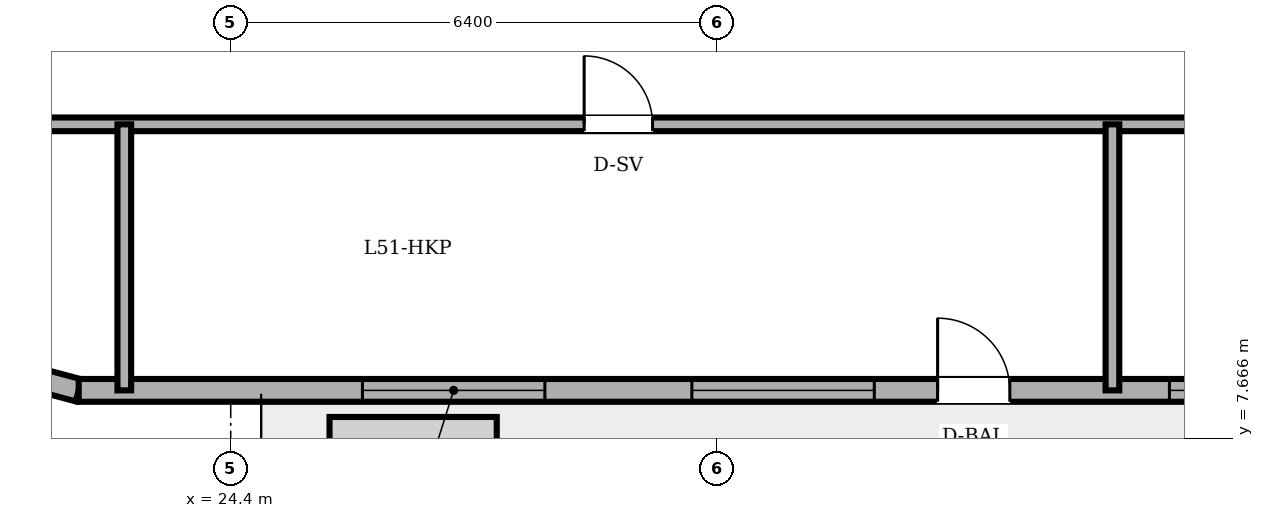
"""IFC4 building model, lengths in metres.
Left out: names, types, materials, properties, quantities, classifications, styles, units other than length and angle.
Written with IfcOpenShell. Run it as: python <this file> out.ifc"""

import sys

from ifc_helpers import new_model, si_unit, direction, frame, frame_2d, origin, place, context, subcontext, project, spatial, rectangle, extrude, element, fill, save


model = new_model("IFC4")
c1 = context("Model", 3, precision=1e-05, world=origin(), true_north=direction((0.0, 1.0)))
c2 = subcontext(c1, "Body", "Model", "MODEL_VIEW")
j1 = project(units=[si_unit("LENGTHUNIT", "METRE"), si_unit("PLANEANGLEUNIT", "RADIAN")], contexts=[c1])
p1 = place(None, origin())
s1 = spatial("IfcSite", under=j1, at=p1, CompositionType="ELEMENT")
p2 = place(p1, origin())
s2 = spatial("IfcBuilding", under=s1, at=p2, CompositionType="ELEMENT")
p3 = place(p2, frame((0.0, 0.0, 196.2)))
s3 = spatial("IfcBuildingStorey", under=s2, at=p3, CompositionType="ELEMENT", Elevation=196.2)
p4 = place(p3, frame((19.8, 8.997, 0.0), z_axis=(0.0, 0.0, 1.0), x_axis=(0.965889330541, -0.258955210695, 0.0)))
e1 = element("IfcWall", 1, at=p4, inside=s3, PredefinedType="SOLIDWALL", context=c2, shape_type="SweptSolid", body=[
    extrude(rectangle(XDim=2.692, YDim=0.3, at=frame_2d((1.346, 0.0))), origin(), (0.0, 0.0, 1.0), 4.9),
])
p5 = place(p3, frame((22.4, 8.3, 0.0), z_axis=(0.0, 0.0, 1.0), x_axis=(1.0, 0.0, 0.0)))
e2 = element("IfcWall", 2, at=p5, inside=s3, PredefinedType="SOLIDWALL", context=c2, shape_type="SweptSolid", body=[
    extrude(rectangle(XDim=32.485, YDim=0.3, at=frame_2d((16.243, 0.0))), origin(), (0.0, 0.0, 1.0), 4.9),
])
p6 = place(p5, frame((11.3, 0.0, 0.0)))
e3 = element("IfcOpeningElement", 3, at=p6, cuts=e2, PredefinedType="OPENING", context=c2, shape_type="SweptSolid", body=[
    extrude(rectangle(XDim=0.95, YDim=2.2, at=frame_2d((0.475, 1.1))), frame((0.0, 0.16, 0.0), z_axis=(0.0, -1.0, 0.0), x_axis=(1.0, 0.0, 0.0)), (0.0, 0.0, 1.0), 0.32),
])
p7 = place(p5, frame((3.733, 0.0, 0.85)))
e4 = element("IfcOpeningElement", 4, at=p7, cuts=e2, PredefinedType="OPENING", context=c2, shape_type="SweptSolid", body=[
    extrude(rectangle(XDim=2.4, YDim=2.1, at=frame_2d((1.2, 1.05))), frame((0.0, 0.16, 0.0), z_axis=(0.0, -1.0, 0.0), x_axis=(1.0, 0.0, 0.0)), (0.0, 0.0, 1.0), 0.32),
])
p8 = place(p5, frame((8.067, 0.0, 0.85)))
e5 = element("IfcOpeningElement", 5, at=p8, cuts=e2, PredefinedType="OPENING", context=c2, shape_type="SweptSolid", body=[
    extrude(rectangle(XDim=2.4, YDim=2.1, at=frame_2d((1.2, 1.05))), frame((0.0, 0.16, 0.0), z_axis=(0.0, -1.0, 0.0), x_axis=(1.0, 0.0, 0.0)), (0.0, 0.0, 1.0), 0.32),
])
p9 = place(p5, frame((14.35, 0.0, 0.85)))
e6 = element("IfcOpeningElement", 6, at=p9, cuts=e2, PredefinedType="OPENING", context=c2, shape_type="SweptSolid", body=[
    extrude(rectangle(XDim=2.4, YDim=2.1, at=frame_2d((1.2, 1.05))), frame((0.0, 0.16, 0.0), z_axis=(0.0, -1.0, 0.0), x_axis=(1.0, 0.0, 0.0)), (0.0, 0.0, 1.0), 0.32),
])
p10 = place(p5, frame((21.178, 0.0, 0.85)))
e7 = element("IfcOpeningElement", 7, at=p10, cuts=e2, PredefinedType="OPENING", context=c2, shape_type="SweptSolid", body=[
    extrude(rectangle(XDim=2.4, YDim=2.1, at=frame_2d((1.2, 1.05))), frame((0.0, 0.16, 0.0), z_axis=(0.0, -1.0, 0.0), x_axis=(1.0, 0.0, 0.0)), (0.0, 0.0, 1.0), 0.32),
])
p11 = place(p5, frame((26.057, 0.0, 0.85)))
e8 = element("IfcOpeningElement", 8, at=p11, cuts=e2, PredefinedType="OPENING", context=c2, shape_type="SweptSolid", body=[
    extrude(rectangle(XDim=2.4, YDim=2.1, at=frame_2d((1.2, 1.05))), frame((0.0, 0.16, 0.0), z_axis=(0.0, -1.0, 0.0), x_axis=(1.0, 0.0, 0.0)), (0.0, 0.0, 1.0), 0.32),
])
p12 = place(p3, frame((17.656, 11.8, 0.0), z_axis=(0.0, 0.0, 1.0), x_axis=(1.0, 0.0, 0.0)))
e9 = element("IfcWall", 9, at=p12, inside=s3, PredefinedType="PARTITIONING", context=c2, shape_type="SweptSolid", body=[
    extrude(rectangle(XDim=22.244, YDim=0.18, at=frame_2d((11.122, 0.0))), origin(), (0.0, 0.0, 1.0), 4.9),
])
p13 = place(p12, frame((11.394, 0.0, 0.0)))
e10 = element("IfcOpeningElement", 10, at=p13, cuts=e9, PredefinedType="OPENING", context=c2, shape_type="SweptSolid", body=[
    extrude(rectangle(XDim=0.9, YDim=2.05, at=frame_2d((0.45, 1.025))), frame((0.0, 0.1, 0.0), z_axis=(0.0, -1.0, 0.0), x_axis=(1.0, 0.0, 0.0)), (0.0, 0.0, 1.0), 0.2),
])
for number, where, z_axis, x_axis in (
    (11, (23.0, 8.3, 0.0), (0.0, 0.0, 1.0), (0.0, 1.0, 0.0)),
    (12, (36.0, 8.3, 0.0), (0.0, 0.0, 1.0), (0.0, 1.0, 0.0)),
):
    element("IfcWall", number, at=place(p3, frame(where, z_axis=z_axis, x_axis=x_axis)), inside=s3, PredefinedType="PARTITIONING", context=c2, shape_type="SweptSolid", body=[
        extrude(rectangle(XDim=3.5, YDim=0.18, at=frame_2d((1.75, 0.0))), origin(), (0.0, 0.0, 1.0), 4.9),
    ])
p14 = place(p6, origin())
e13 = element("IfcDoor", 13, at=p14, inside=s3, OperationType="SINGLE_SWING_LEFT", PredefinedType="DOOR", context=c2, shape_type="SweptSolid", body=[
    extrude(rectangle(XDim=0.95, YDim=2.2, at=frame_2d((0.475, 1.1))), frame((0.0, 0.025, 0.0), z_axis=(0.0, -1.0, 0.0), x_axis=(1.0, 0.0, 0.0)), (0.0, 0.0, 1.0), 0.05),
])
fill(e3, e13)
p15 = place(p7, origin())
e14 = element("IfcWindow", 14, at=p15, inside=s3, PartitioningType="TRIPLE_PANEL_VERTICAL", PredefinedType="WINDOW", context=c2, shape_type="SweptSolid", body=[
    extrude(rectangle(XDim=2.4, YDim=2.1, at=frame_2d((1.2, 1.05))), frame((0.0, 0.03, 0.0), z_axis=(0.0, -1.0, 0.0), x_axis=(1.0, 0.0, 0.0)), (0.0, 0.0, 1.0), 0.06),
])
fill(e4, e14)
p16 = place(p8, origin())
e15 = element("IfcWindow", 15, at=p16, inside=s3, PartitioningType="TRIPLE_PANEL_VERTICAL", PredefinedType="WINDOW", context=c2, shape_type="SweptSolid", body=[
    extrude(rectangle(XDim=2.4, YDim=2.1, at=frame_2d((1.2, 1.05))), frame((0.0, 0.03, 0.0), z_axis=(0.0, -1.0, 0.0), x_axis=(1.0, 0.0, 0.0)), (0.0, 0.0, 1.0), 0.06),
])
fill(e5, e15)
p17 = place(p9, origin())
e16 = element("IfcWindow", 16, at=p17, inside=s3, PartitioningType="TRIPLE_PANEL_VERTICAL", PredefinedType="WINDOW", context=c2, shape_type="SweptSolid", body=[
    extrude(rectangle(XDim=2.4, YDim=2.1, at=frame_2d((1.2, 1.05))), frame((0.0, 0.03, 0.0), z_axis=(0.0, -1.0, 0.0), x_axis=(1.0, 0.0, 0.0)), (0.0, 0.0, 1.0), 0.06),
])
fill(e6, e16)
p18 = place(p13, origin())
e17 = element("IfcDoor", 17, at=p18, inside=s3, OperationType="SINGLE_SWING_LEFT", PredefinedType="DOOR", context=c2, shape_type="SweptSolid", body=[
    extrude(rectangle(XDim=0.9, YDim=2.05, at=frame_2d((0.45, 1.025))), frame((0.0, 0.025, 0.0), z_axis=(0.0, -1.0, 0.0), x_axis=(1.0, 0.0, 0.0)), (0.0, 0.0, 1.0), 0.05),
])
fill(e10, e17)
save(model, sys.argv[1])
